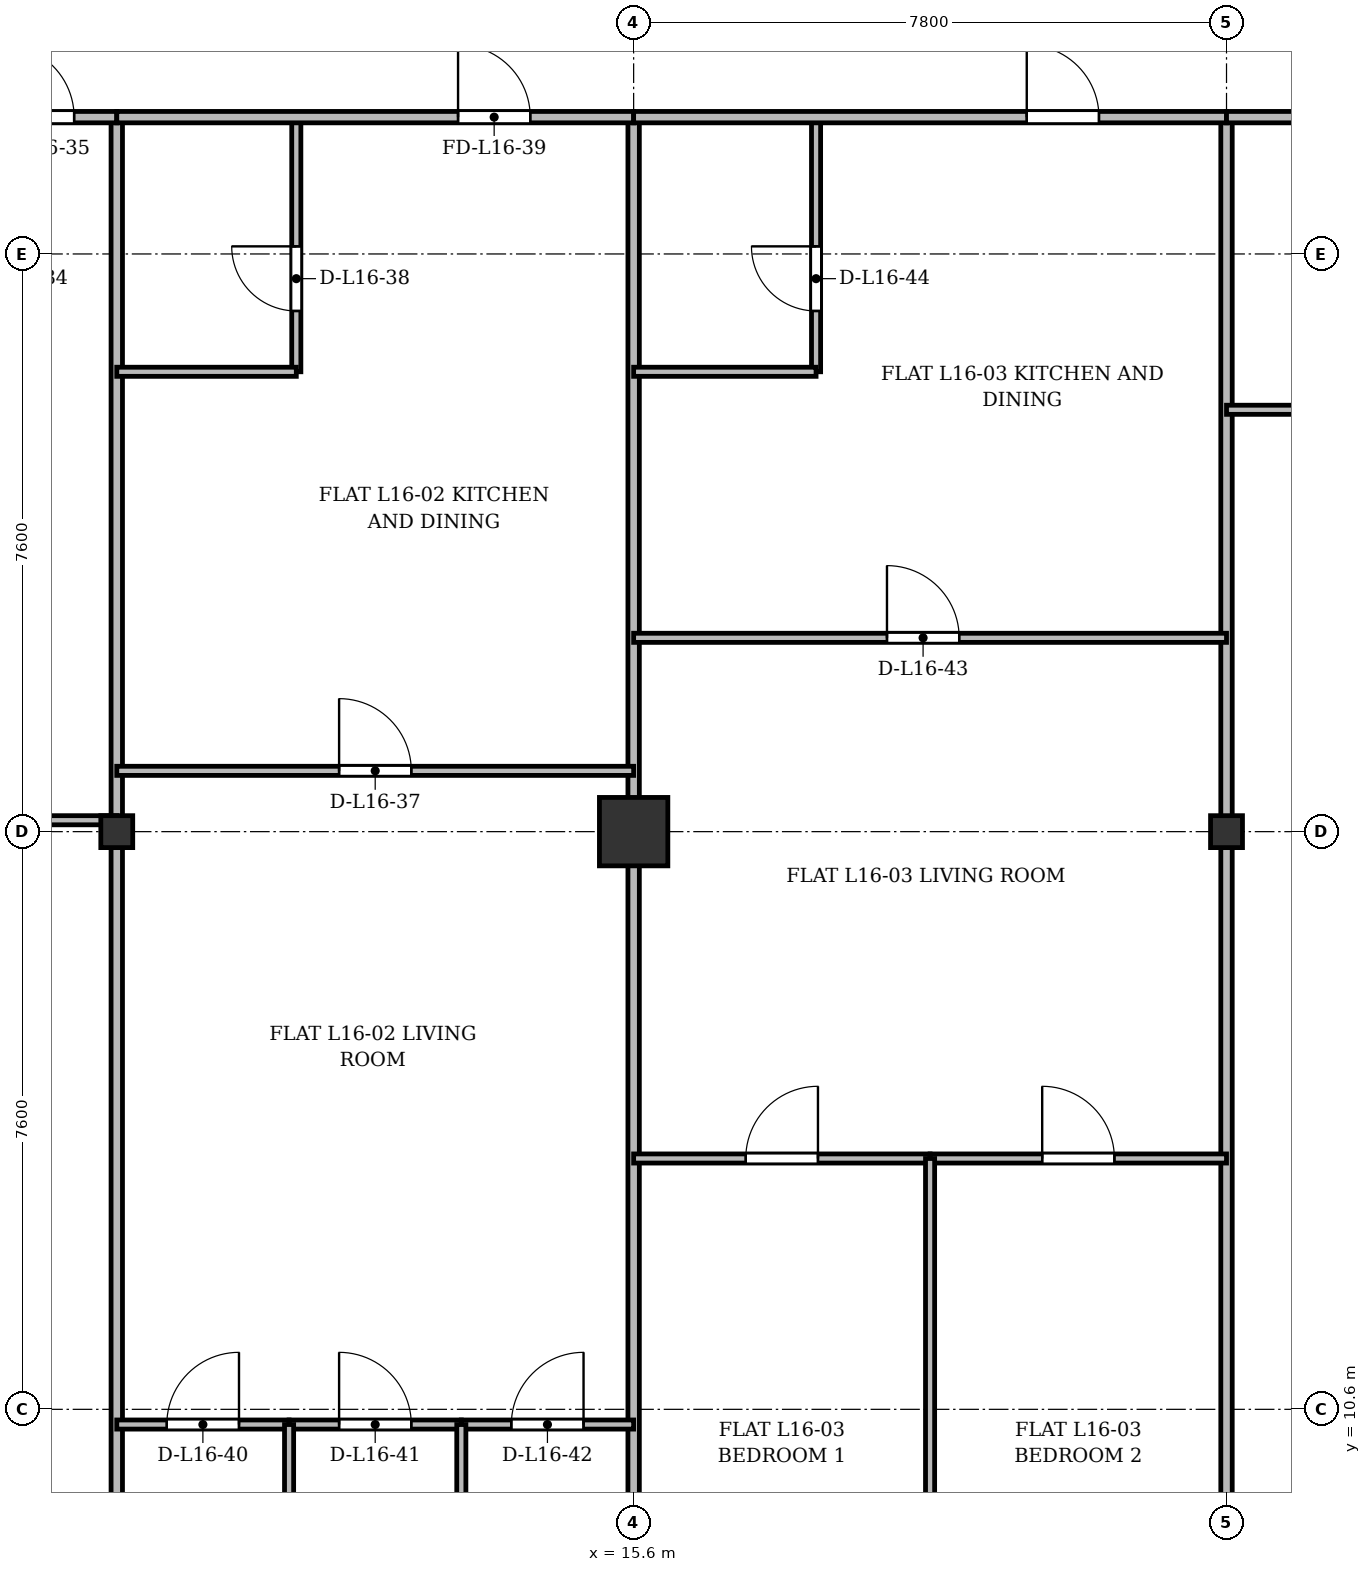
"""IFC4 building model, lengths in metres.
Left out: names, types, materials, properties, quantities, classifications, styles, units other than length and angle.
Written with IfcOpenShell. Run it as: python <this file> out.ifc"""

import sys

from ifc_helpers import new_model, si_unit, direction, frame, frame_2d, origin, origin_2d, place, context, subcontext, project, spatial, rectangle, i_section, extrude, source, transform, mapped, element, fill, save


model = new_model("IFC4")
c1 = context("Model", 3, precision=1e-05, world=origin(), true_north=direction((0.0, 1.0)))
c2 = subcontext(c1, "Body", "Model", "MODEL_VIEW")
j1 = project(units=[si_unit("LENGTHUNIT", "METRE"), si_unit("PLANEANGLEUNIT", "RADIAN")], contexts=[c1])
p1 = place(None, origin())
s1 = spatial("IfcSite", under=j1, at=p1, CompositionType="ELEMENT")
p2 = place(p1, origin())
s2 = spatial("IfcBuilding", under=s1, at=p2, CompositionType="ELEMENT")
p3 = place(p2, frame((0.0, 0.0, 63.1)))
s3 = spatial("IfcBuildingStorey", under=s2, at=p3, CompositionType="ELEMENT", Elevation=63.1)
m1 = source(origin(), c2, "Body", "SweptSolid", [
    extrude(i_section(OverallWidth=0.42, OverallDepth=0.42, WebThickness=0.026, FlangeThickness=0.04, at=origin_2d()), origin(), (0.0, 0.0, 1.0), 3.6),
])
p4 = place(p3, frame((8.8, 18.2, 0.0), z_axis=(0.0, 0.0, 1.0), x_axis=(1.0, 0.0, 0.0)))
e1 = element("IfcColumn", 1, at=p4, inside=s3, PredefinedType="COLUMN", context=c2, shape_type="MappedRepresentation", body=[
    mapped(m1, transform((0.0, 0.0, 0.0), x_axis=(1.0, 0.0, 0.0), y_axis=(0.0, 1.0, 0.0), z_axis=(0.0, 0.0, 1.0), scale=1.0)),
])
m2 = source(origin(), c2, "Body", "SweptSolid", [
    extrude(rectangle(XDim=0.9, YDim=0.9, at=origin_2d()), origin(), (0.0, 0.0, 1.0), 3.6),
])
p5 = place(p3, frame((15.6, 18.2, 0.0), z_axis=(0.0, 0.0, 1.0), x_axis=(1.0, 0.0, 0.0)))
e2 = element("IfcColumn", 2, at=p5, inside=s3, PredefinedType="COLUMN", context=c2, shape_type="MappedRepresentation", body=[
    mapped(m2, transform((0.0, 0.0, 0.0), x_axis=(1.0, 0.0, 0.0), y_axis=(0.0, 1.0, 0.0), z_axis=(0.0, 0.0, 1.0), scale=1.0)),
])
p6 = place(p3, frame((23.4, 18.2, 0.0), z_axis=(0.0, 0.0, 1.0), x_axis=(1.0, 0.0, 0.0)))
e3 = element("IfcColumn", 3, at=p6, inside=s3, PredefinedType="COLUMN", context=c2, shape_type="MappedRepresentation", body=[
    mapped(m1, transform((0.0, 0.0, 0.0), x_axis=(1.0, 0.0, 0.0), y_axis=(0.0, 1.0, 0.0), z_axis=(0.0, 0.0, 1.0), scale=1.0)),
])
for number, where, z_axis, x_axis in (
    (4, (8.8, 3.145, 0.0), (0.0, 0.0, 1.0), (0.0, 1.0, 0.0)),
    (5, (15.6, 3.145, 0.0), (0.0, 0.0, 1.0), (0.0, 1.0, 0.0)),
):
    element("IfcWall", number, at=place(p3, frame(where, z_axis=z_axis, x_axis=x_axis)), inside=s3, PredefinedType="PARTITIONING", context=c2, shape_type="SweptSolid", body=[
        extrude(rectangle(XDim=24.455, YDim=0.15, at=frame_2d((12.228, 0.0))), origin(), (0.0, 0.0, 1.0), 2.752),
    ])
p7 = place(p3, frame((23.4, 6.645, 0.0), z_axis=(0.0, 0.0, 1.0), x_axis=(0.0, 1.0, 0.0)))
e6 = element("IfcWall", 6, at=p7, inside=s3, PredefinedType="PARTITIONING", context=c2, shape_type="SweptSolid", body=[
    extrude(rectangle(XDim=20.955, YDim=0.15, at=frame_2d((10.478, 0.0))), origin(), (0.0, 0.0, 1.0), 2.752),
])
p8 = place(p3, frame((4.76, 18.35, 0.0), z_axis=(0.0, 0.0, 1.0), x_axis=(1.0, 0.0, 0.0)))
e7 = element("IfcWall", 7, at=p8, inside=s3, PredefinedType="PARTITIONING", context=c2, shape_type="SweptSolid", body=[
    extrude(rectangle(XDim=4.04, YDim=0.12, at=frame_2d((2.02, 0.0))), origin(), (0.0, 0.0, 1.0), 2.69),
])
p9 = place(p8, frame((1.545, 0.0, 0.0)))
e8 = element("IfcOpeningElement", 8, at=p9, cuts=e7, PredefinedType="OPENING", context=c2, shape_type="SweptSolid", body=[
    extrude(rectangle(XDim=0.95, YDim=2.15, at=frame_2d((0.475, 1.075))), frame((0.0, 0.07, 0.0), z_axis=(0.0, -1.0, 0.0), x_axis=(1.0, 0.0, 0.0)), (0.0, 0.0, 1.0), 0.14),
])
p10 = place(p3, frame((4.745, 27.6, 0.0), z_axis=(0.0, 0.0, 1.0), x_axis=(1.0, 0.0, 0.0)))
e9 = element("IfcWall", 9, at=p10, inside=s3, PredefinedType="PARTITIONING", context=c2, shape_type="SweptSolid", body=[
    extrude(rectangle(XDim=4.055, YDim=0.15, at=frame_2d((2.027, 0.0))), origin(), (0.0, 0.0, 1.0), 2.752),
])
p11 = place(p10, frame((2.544, 0.0, 0.0)))
e10 = element("IfcOpeningElement", 10, at=p11, cuts=e9, PredefinedType="OPENING", context=c2, shape_type="SweptSolid", body=[
    extrude(rectangle(XDim=0.95, YDim=2.15, at=frame_2d((0.475, 1.075))), frame((0.0, 0.085, 0.0), z_axis=(0.0, -1.0, 0.0), x_axis=(1.0, 0.0, 0.0)), (0.0, 0.0, 1.0), 0.17),
])
p12 = place(p3, frame((8.8, 19.0, 0.0), z_axis=(0.0, 0.0, 1.0), x_axis=(1.0, 0.0, 0.0)))
e11 = element("IfcWall", 11, at=p12, inside=s3, PredefinedType="PARTITIONING", context=c2, shape_type="SweptSolid", body=[
    extrude(rectangle(XDim=6.8, YDim=0.12, at=frame_2d((3.4, 0.0))), origin(), (0.0, 0.0, 1.0), 2.752),
])
p13 = place(p12, frame((2.925, 0.0, 0.0)))
e12 = element("IfcOpeningElement", 12, at=p13, cuts=e11, PredefinedType="OPENING", context=c2, shape_type="SweptSolid", body=[
    extrude(rectangle(XDim=0.95, YDim=2.15, at=frame_2d((0.475, 1.075))), frame((0.0, 0.07, 0.0), z_axis=(0.0, -1.0, 0.0), x_axis=(1.0, 0.0, 0.0)), (0.0, 0.0, 1.0), 0.14),
])
p14 = place(p3, frame((11.162, 24.25, 0.0), z_axis=(0.0, 0.0, 1.0), x_axis=(0.0, 1.0, 0.0)))
e13 = element("IfcWall", 13, at=p14, inside=s3, PredefinedType="PARTITIONING", context=c2, shape_type="SweptSolid", body=[
    extrude(rectangle(XDim=3.35, YDim=0.12, at=frame_2d((1.675, 0.0))), origin(), (0.0, 0.0, 1.0), 2.94),
])
p15 = place(p14, frame((0.8, 0.0, 0.0)))
e14 = element("IfcOpeningElement", 14, at=p15, cuts=e13, PredefinedType="OPENING", context=c2, shape_type="SweptSolid", body=[
    extrude(rectangle(XDim=0.85, YDim=2.1, at=frame_2d((0.425, 1.05))), frame((0.0, 0.07, 0.0), z_axis=(0.0, -1.0, 0.0), x_axis=(1.0, 0.0, 0.0)), (0.0, 0.0, 1.0), 0.14),
])
p16 = place(p3, frame((8.8, 24.25, 0.0), z_axis=(0.0, 0.0, 1.0), x_axis=(1.0, 0.0, 0.0)))
e15 = element("IfcWall", 15, at=p16, inside=s3, PredefinedType="PARTITIONING", context=c2, shape_type="SweptSolid", body=[
    extrude(rectangle(XDim=2.362, YDim=0.12, at=frame_2d((1.181, 0.0))), origin(), (0.0, 0.0, 1.0), 2.752),
])
p17 = place(p3, frame((8.8, 27.6, 0.0), z_axis=(0.0, 0.0, 1.0), x_axis=(1.0, 0.0, 0.0)))
e16 = element("IfcWall", 16, at=p17, inside=s3, PredefinedType="PARTITIONING", context=c2, shape_type="SweptSolid", body=[
    extrude(rectangle(XDim=6.8, YDim=0.15, at=frame_2d((3.4, 0.0))), origin(), (0.0, 0.0, 1.0), 2.752),
])
p18 = place(p17, frame((4.49, 0.0, 0.0)))
e17 = element("IfcOpeningElement", 17, at=p18, cuts=e16, PredefinedType="OPENING", context=c2, shape_type="SweptSolid", body=[
    extrude(rectangle(XDim=0.95, YDim=2.15, at=frame_2d((0.475, 1.075))), frame((0.0, 0.085, 0.0), z_axis=(0.0, -1.0, 0.0), x_axis=(1.0, 0.0, 0.0)), (0.0, 0.0, 1.0), 0.17),
])
p19 = place(p3, frame((8.8, 10.4, 0.0), z_axis=(0.0, 0.0, 1.0), x_axis=(1.0, 0.0, 0.0)))
e18 = element("IfcWall", 18, at=p19, inside=s3, PredefinedType="PARTITIONING", context=c2, shape_type="SweptSolid", body=[
    extrude(rectangle(XDim=2.267, YDim=0.12, at=frame_2d((1.133, 0.0))), origin(), (0.0, 0.0, 1.0), 2.752),
])
p20 = place(p19, frame((0.658, 0.0, 0.0)))
e19 = element("IfcOpeningElement", 19, at=p20, cuts=e18, PredefinedType="OPENING", context=c2, shape_type="SweptSolid", body=[
    extrude(rectangle(XDim=0.95, YDim=2.15, at=frame_2d((0.475, 1.075))), frame((0.0, 0.07, 0.0), z_axis=(0.0, -1.0, 0.0), x_axis=(1.0, 0.0, 0.0)), (0.0, 0.0, 1.0), 0.14),
])
p21 = place(p3, frame((11.067, 10.4, 0.0), z_axis=(0.0, 0.0, 1.0), x_axis=(1.0, 0.0, 0.0)))
e20 = element("IfcWall", 20, at=p21, inside=s3, PredefinedType="PARTITIONING", context=c2, shape_type="SweptSolid", body=[
    extrude(rectangle(XDim=2.266, YDim=0.12, at=frame_2d((1.133, 0.0))), origin(), (0.0, 0.0, 1.0), 3.34),
])
p22 = place(p21, frame((0.658, 0.0, 0.0)))
e21 = element("IfcOpeningElement", 21, at=p22, cuts=e20, PredefinedType="OPENING", context=c2, shape_type="SweptSolid", body=[
    extrude(rectangle(XDim=0.95, YDim=2.15, at=frame_2d((0.475, 1.075))), frame((0.0, 0.07, 0.0), z_axis=(0.0, -1.0, 0.0), x_axis=(1.0, 0.0, 0.0)), (0.0, 0.0, 1.0), 0.14),
])
p23 = place(p3, frame((11.067, 3.145, 0.0), z_axis=(0.0, 0.0, 1.0), x_axis=(0.0, 1.0, 0.0)))
e22 = element("IfcWall", 22, at=p23, inside=s3, PredefinedType="PARTITIONING", context=c2, shape_type="SweptSolid", body=[
    extrude(rectangle(XDim=7.255, YDim=0.12, at=frame_2d((3.627, 0.0))), origin(), (0.0, 0.0, 1.0), 2.69),
])
p24 = place(p3, frame((13.333, 10.4, 0.0), z_axis=(0.0, 0.0, 1.0), x_axis=(1.0, 0.0, 0.0)))
e23 = element("IfcWall", 23, at=p24, inside=s3, PredefinedType="PARTITIONING", context=c2, shape_type="SweptSolid", body=[
    extrude(rectangle(XDim=2.267, YDim=0.12, at=frame_2d((1.134, 0.0))), origin(), (0.0, 0.0, 1.0), 2.752),
])
p25 = place(p24, frame((0.658, 0.0, 0.0)))
e24 = element("IfcOpeningElement", 24, at=p25, cuts=e23, PredefinedType="OPENING", context=c2, shape_type="SweptSolid", body=[
    extrude(rectangle(XDim=0.95, YDim=2.15, at=frame_2d((0.475, 1.075))), frame((0.0, 0.07, 0.0), z_axis=(0.0, -1.0, 0.0), x_axis=(1.0, 0.0, 0.0)), (0.0, 0.0, 1.0), 0.14),
])
p26 = place(p3, frame((13.333, 3.145, 0.0), z_axis=(0.0, 0.0, 1.0), x_axis=(0.0, 1.0, 0.0)))
e25 = element("IfcWall", 25, at=p26, inside=s3, PredefinedType="PARTITIONING", context=c2, shape_type="SweptSolid", body=[
    extrude(rectangle(XDim=7.255, YDim=0.12, at=frame_2d((3.627, 0.0))), origin(), (0.0, 0.0, 1.0), 2.69),
])
p27 = place(p3, frame((15.6, 20.75, 0.0), z_axis=(0.0, 0.0, 1.0), x_axis=(1.0, 0.0, 0.0)))
e26 = element("IfcWall", 26, at=p27, inside=s3, PredefinedType="PARTITIONING", context=c2, shape_type="SweptSolid", body=[
    extrude(rectangle(XDim=7.8, YDim=0.12, at=frame_2d((3.9, 0.0))), origin(), (0.0, 0.0, 1.0), 2.752),
])
p28 = place(p27, frame((3.333, 0.0, 0.0)))
e27 = element("IfcOpeningElement", 27, at=p28, cuts=e26, PredefinedType="OPENING", context=c2, shape_type="SweptSolid", body=[
    extrude(rectangle(XDim=0.95, YDim=2.15, at=frame_2d((0.475, 1.075))), frame((0.0, 0.07, 0.0), z_axis=(0.0, -1.0, 0.0), x_axis=(1.0, 0.0, 0.0)), (0.0, 0.0, 1.0), 0.14),
])
p29 = place(p3, frame((18.0, 24.25, 0.0), z_axis=(0.0, 0.0, 1.0), x_axis=(0.0, 1.0, 0.0)))
e28 = element("IfcWall", 28, at=p29, inside=s3, PredefinedType="PARTITIONING", context=c2, shape_type="SweptSolid", body=[
    extrude(rectangle(XDim=3.35, YDim=0.12, at=frame_2d((1.675, 0.0))), origin(), (0.0, 0.0, 1.0), 2.94),
])
p30 = place(p29, frame((0.8, 0.0, 0.0)))
e29 = element("IfcOpeningElement", 29, at=p30, cuts=e28, PredefinedType="OPENING", context=c2, shape_type="SweptSolid", body=[
    extrude(rectangle(XDim=0.85, YDim=2.1, at=frame_2d((0.425, 1.05))), frame((0.0, 0.07, 0.0), z_axis=(0.0, -1.0, 0.0), x_axis=(1.0, 0.0, 0.0)), (0.0, 0.0, 1.0), 0.14),
])
p31 = place(p3, frame((15.6, 24.25, 0.0), z_axis=(0.0, 0.0, 1.0), x_axis=(1.0, 0.0, 0.0)))
e30 = element("IfcWall", 30, at=p31, inside=s3, PredefinedType="PARTITIONING", context=c2, shape_type="SweptSolid", body=[
    extrude(rectangle(XDim=2.4, YDim=0.12, at=frame_2d((1.2, 0.0))), origin(), (0.0, 0.0, 1.0), 2.752),
])
p32 = place(p3, frame((15.6, 27.6, 0.0), z_axis=(0.0, 0.0, 1.0), x_axis=(1.0, 0.0, 0.0)))
e31 = element("IfcWall", 31, at=p32, inside=s3, PredefinedType="PARTITIONING", context=c2, shape_type="SweptSolid", body=[
    extrude(rectangle(XDim=7.8, YDim=0.15, at=frame_2d((3.9, 0.0))), origin(), (0.0, 0.0, 1.0), 2.752),
])
p33 = place(p32, frame((5.172, 0.0, 0.0)))
e32 = element("IfcOpeningElement", 32, at=p33, cuts=e31, PredefinedType="OPENING", context=c2, shape_type="SweptSolid", body=[
    extrude(rectangle(XDim=0.95, YDim=2.15, at=frame_2d((0.475, 1.075))), frame((0.0, 0.085, 0.0), z_axis=(0.0, -1.0, 0.0), x_axis=(1.0, 0.0, 0.0)), (0.0, 0.0, 1.0), 0.17),
])
p34 = place(p3, frame((15.6, 13.9, 0.0), z_axis=(0.0, 0.0, 1.0), x_axis=(1.0, 0.0, 0.0)))
e33 = element("IfcWall", 33, at=p34, inside=s3, PredefinedType="PARTITIONING", context=c2, shape_type="SweptSolid", body=[
    extrude(rectangle(XDim=3.9, YDim=0.12, at=frame_2d((1.95, 0.0))), origin(), (0.0, 0.0, 1.0), 2.752),
])
p35 = place(p34, frame((1.475, 0.0, 0.0)))
e34 = element("IfcOpeningElement", 34, at=p35, cuts=e33, PredefinedType="OPENING", context=c2, shape_type="SweptSolid", body=[
    extrude(rectangle(XDim=0.95, YDim=2.15, at=frame_2d((0.475, 1.075))), frame((0.0, 0.07, 0.0), z_axis=(0.0, -1.0, 0.0), x_axis=(1.0, 0.0, 0.0)), (0.0, 0.0, 1.0), 0.14),
])
p36 = place(p3, frame((19.5, 13.9, 0.0), z_axis=(0.0, 0.0, 1.0), x_axis=(1.0, 0.0, 0.0)))
e35 = element("IfcWall", 35, at=p36, inside=s3, PredefinedType="PARTITIONING", context=c2, shape_type="SweptSolid", body=[
    extrude(rectangle(XDim=3.9, YDim=0.12, at=frame_2d((1.95, 0.0))), origin(), (0.0, 0.0, 1.0), 2.752),
])
p37 = place(p36, frame((1.475, 0.0, 0.0)))
e36 = element("IfcOpeningElement", 36, at=p37, cuts=e35, PredefinedType="OPENING", context=c2, shape_type="SweptSolid", body=[
    extrude(rectangle(XDim=0.95, YDim=2.15, at=frame_2d((0.475, 1.075))), frame((0.0, 0.07, 0.0), z_axis=(0.0, -1.0, 0.0), x_axis=(1.0, 0.0, 0.0)), (0.0, 0.0, 1.0), 0.14),
])
p38 = place(p3, frame((19.5, 6.645, 0.0), z_axis=(0.0, 0.0, 1.0), x_axis=(0.0, 1.0, 0.0)))
e37 = element("IfcWall", 37, at=p38, inside=s3, PredefinedType="PARTITIONING", context=c2, shape_type="SweptSolid", body=[
    extrude(rectangle(XDim=7.255, YDim=0.12, at=frame_2d((3.627, 0.0))), origin(), (0.0, 0.0, 1.0), 3.34),
])
p39 = place(p3, frame((23.4, 27.6, 0.0), z_axis=(0.0, 0.0, 1.0), x_axis=(1.0, 0.0, 0.0)))
e38 = element("IfcWall", 38, at=p39, inside=s3, PredefinedType="PARTITIONING", context=c2, shape_type="SweptSolid", body=[
    extrude(rectangle(XDim=7.2, YDim=0.15, at=frame_2d((3.6, 0.0))), origin(), (0.0, 0.0, 1.0), 2.752),
])
p40 = place(p39, frame((3.125, 0.0, 0.0)))
e39 = element("IfcOpeningElement", 39, at=p40, cuts=e38, PredefinedType="OPENING", context=c2, shape_type="SweptSolid", body=[
    extrude(rectangle(XDim=0.95, YDim=2.15, at=frame_2d((0.475, 1.075))), frame((0.0, 0.085, 0.0), z_axis=(0.0, -1.0, 0.0), x_axis=(1.0, 0.0, 0.0)), (0.0, 0.0, 1.0), 0.17),
])
p41 = place(p3, frame((23.4, 23.75, 0.0), z_axis=(0.0, 0.0, 1.0), x_axis=(1.0, 0.0, 0.0)))
e40 = element("IfcWall", 40, at=p41, inside=s3, PredefinedType="PARTITIONING", context=c2, shape_type="SweptSolid", body=[
    extrude(rectangle(XDim=7.2, YDim=0.12, at=frame_2d((3.6, 0.0))), origin(), (0.0, 0.0, 1.0), 2.752),
])
p42 = place(p41, frame((3.125, 0.0, 0.0)))
e41 = element("IfcOpeningElement", 41, at=p42, cuts=e40, PredefinedType="OPENING", context=c2, shape_type="SweptSolid", body=[
    extrude(rectangle(XDim=0.95, YDim=2.15, at=frame_2d((0.475, 1.075))), frame((0.0, 0.07, 0.0), z_axis=(0.0, -1.0, 0.0), x_axis=(1.0, 0.0, 0.0)), (0.0, 0.0, 1.0), 0.14),
])
m3 = source(origin(), c2, "Body", "SweptSolid", [
    extrude(rectangle(XDim=0.95, YDim=2.15, at=frame_2d((0.475, 1.075))), frame((0.0, 0.025, 0.0), z_axis=(0.0, -1.0, 0.0), x_axis=(1.0, 0.0, 0.0)), (0.0, 0.0, 1.0), 0.05),
])
p43 = place(p11, origin())
e42 = element("IfcDoor", 42, at=p43, inside=s3, OperationType="SINGLE_SWING_LEFT", PredefinedType="DOOR", context=c2, shape_type="MappedRepresentation", body=[
    mapped(m3, transform((0.0, 0.0, 0.0), x_axis=(1.0, 0.0, 0.0), y_axis=(0.0, 1.0, 0.0), z_axis=(0.0, 0.0, 1.0), scale=1.0)),
])
fill(e10, e42)
p44 = place(p13, origin())
e43 = element("IfcDoor", 43, at=p44, inside=s3, OperationType="SINGLE_SWING_LEFT", PredefinedType="DOOR", context=c2, shape_type="MappedRepresentation", body=[
    mapped(m3, transform((0.0, 0.0, 0.0), x_axis=(1.0, 0.0, 0.0), y_axis=(0.0, 1.0, 0.0), z_axis=(0.0, 0.0, 1.0), scale=1.0)),
])
fill(e12, e43)
m4 = source(origin(), c2, "Body", "SweptSolid", [
    extrude(rectangle(XDim=0.85, YDim=2.1, at=frame_2d((0.425, 1.05))), frame((0.0, 0.025, 0.0), z_axis=(0.0, -1.0, 0.0), x_axis=(1.0, 0.0, 0.0)), (0.0, 0.0, 1.0), 0.05),
])
p45 = place(p15, origin())
e44 = element("IfcDoor", 44, at=p45, inside=s3, OperationType="SINGLE_SWING_RIGHT", PredefinedType="DOOR", context=c2, shape_type="MappedRepresentation", body=[
    mapped(m4, transform((0.0, 0.0, 0.0), x_axis=(1.0, 0.0, 0.0), y_axis=(0.0, 1.0, 0.0), z_axis=(0.0, 0.0, 1.0), scale=1.0)),
])
fill(e14, e44)
p46 = place(p18, origin())
e45 = element("IfcDoor", 45, at=p46, inside=s3, OperationType="SINGLE_SWING_LEFT", PredefinedType="DOOR", context=c2, shape_type="MappedRepresentation", body=[
    mapped(m3, transform((0.0, 0.0, 0.0), x_axis=(1.0, 0.0, 0.0), y_axis=(0.0, 1.0, 0.0), z_axis=(0.0, 0.0, 1.0), scale=1.0)),
])
fill(e17, e45)
p47 = place(p20, origin())
e46 = element("IfcDoor", 46, at=p47, inside=s3, OperationType="SINGLE_SWING_RIGHT", PredefinedType="DOOR", context=c2, shape_type="MappedRepresentation", body=[
    mapped(m3, transform((0.0, 0.0, 0.0), x_axis=(1.0, 0.0, 0.0), y_axis=(0.0, 1.0, 0.0), z_axis=(0.0, 0.0, 1.0), scale=1.0)),
])
fill(e19, e46)
p48 = place(p22, origin())
e47 = element("IfcDoor", 47, at=p48, inside=s3, OperationType="SINGLE_SWING_LEFT", PredefinedType="DOOR", context=c2, shape_type="MappedRepresentation", body=[
    mapped(m3, transform((0.0, 0.0, 0.0), x_axis=(1.0, 0.0, 0.0), y_axis=(0.0, 1.0, 0.0), z_axis=(0.0, 0.0, 1.0), scale=1.0)),
])
fill(e21, e47)
p49 = place(p25, origin())
e48 = element("IfcDoor", 48, at=p49, inside=s3, OperationType="SINGLE_SWING_RIGHT", PredefinedType="DOOR", context=c2, shape_type="MappedRepresentation", body=[
    mapped(m3, transform((0.0, 0.0, 0.0), x_axis=(1.0, 0.0, 0.0), y_axis=(0.0, 1.0, 0.0), z_axis=(0.0, 0.0, 1.0), scale=1.0)),
])
fill(e24, e48)
p50 = place(p28, origin())
e49 = element("IfcDoor", 49, at=p50, inside=s3, OperationType="SINGLE_SWING_LEFT", PredefinedType="DOOR", context=c2, shape_type="MappedRepresentation", body=[
    mapped(m3, transform((0.0, 0.0, 0.0), x_axis=(1.0, 0.0, 0.0), y_axis=(0.0, 1.0, 0.0), z_axis=(0.0, 0.0, 1.0), scale=1.0)),
])
fill(e27, e49)
p51 = place(p30, origin())
e50 = element("IfcDoor", 50, at=p51, inside=s3, OperationType="SINGLE_SWING_RIGHT", PredefinedType="DOOR", context=c2, shape_type="MappedRepresentation", body=[
    mapped(m4, transform((0.0, 0.0, 0.0), x_axis=(1.0, 0.0, 0.0), y_axis=(0.0, 1.0, 0.0), z_axis=(0.0, 0.0, 1.0), scale=1.0)),
])
fill(e29, e50)
p52 = place(p33, origin())
e51 = element("IfcDoor", 51, at=p52, inside=s3, OperationType="SINGLE_SWING_LEFT", PredefinedType="DOOR", context=c2, shape_type="MappedRepresentation", body=[
    mapped(m3, transform((0.0, 0.0, 0.0), x_axis=(1.0, 0.0, 0.0), y_axis=(0.0, 1.0, 0.0), z_axis=(0.0, 0.0, 1.0), scale=1.0)),
])
fill(e32, e51)
p53 = place(p35, origin())
e52 = element("IfcDoor", 52, at=p53, inside=s3, OperationType="SINGLE_SWING_RIGHT", PredefinedType="DOOR", context=c2, shape_type="MappedRepresentation", body=[
    mapped(m3, transform((0.0, 0.0, 0.0), x_axis=(1.0, 0.0, 0.0), y_axis=(0.0, 1.0, 0.0), z_axis=(0.0, 0.0, 1.0), scale=1.0)),
])
fill(e34, e52)
p54 = place(p37, origin())
e53 = element("IfcDoor", 53, at=p54, inside=s3, OperationType="SINGLE_SWING_LEFT", PredefinedType="DOOR", context=c2, shape_type="MappedRepresentation", body=[
    mapped(m3, transform((0.0, 0.0, 0.0), x_axis=(1.0, 0.0, 0.0), y_axis=(0.0, 1.0, 0.0), z_axis=(0.0, 0.0, 1.0), scale=1.0)),
])
fill(e36, e53)
save(model, sys.argv[1])
